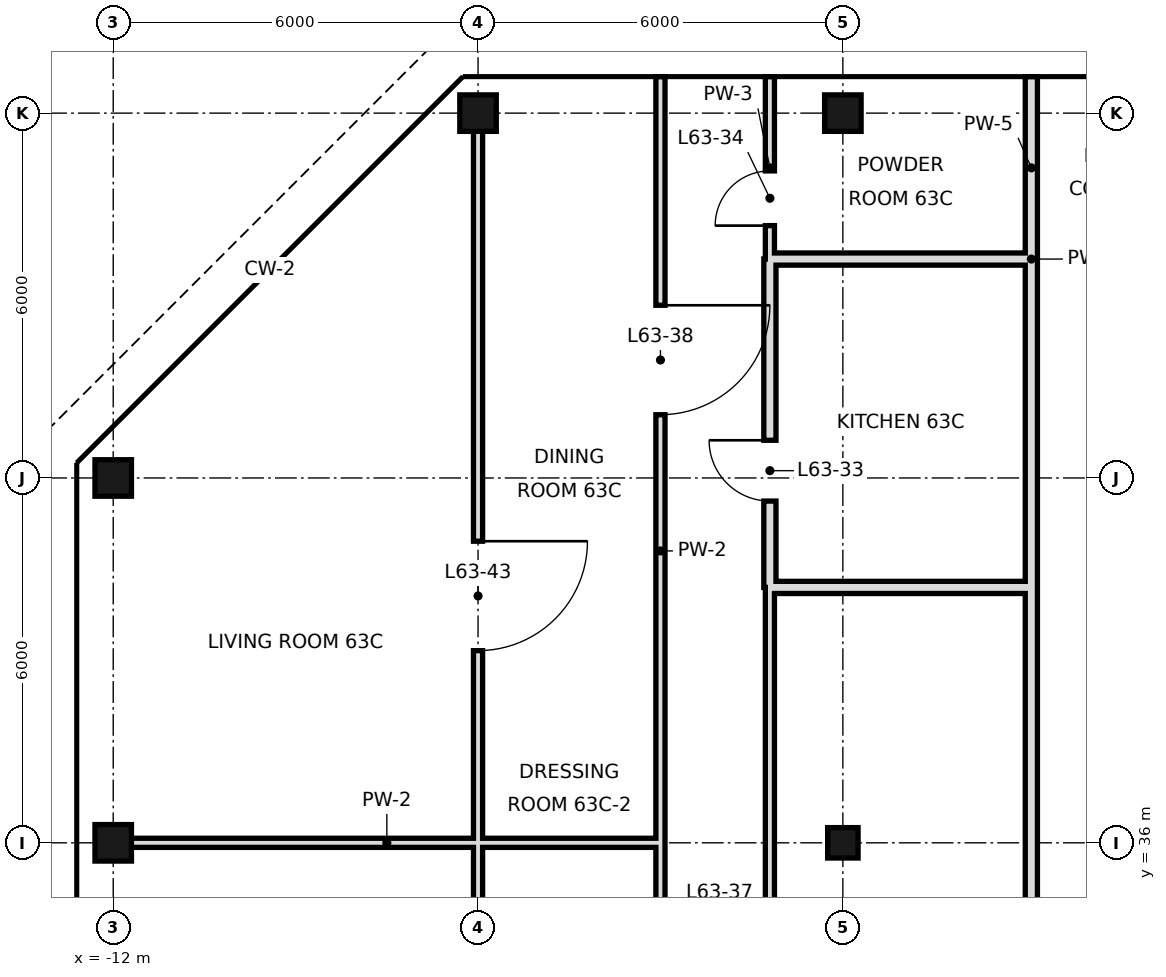
"""IFC4 building model, lengths in metres.
Left out: names, types, materials, properties, quantities, classifications, styles, units other than length and angle.
Written with IfcOpenShell. Run it as: python <this file> out.ifc"""

import sys

from ifc_helpers import new_model, si_unit, direction, frame, frame_2d, origin, origin_2d, place, context, subcontext, project, spatial, rectangle, hollow_rectangle, extrude, element, fill, save


model = new_model("IFC4")
c1 = context("Model", 3, precision=1e-05, world=origin(), true_north=direction((0.0, 1.0)))
c2 = subcontext(c1, "Body", "Model", "MODEL_VIEW")
j1 = project(units=[si_unit("LENGTHUNIT", "METRE"), si_unit("PLANEANGLEUNIT", "RADIAN")], contexts=[c1])
p1 = place(None, origin())
s1 = spatial("IfcSite", under=j1, at=p1, CompositionType="ELEMENT")
p2 = place(p1, origin())
s2 = spatial("IfcBuilding", under=s1, at=p2, CompositionType="ELEMENT")
p3 = place(p2, frame((0.0, 0.0, 266.6)))
s3 = spatial("IfcBuildingStorey", under=s2, at=p3, CompositionType="ELEMENT", Elevation=266.6)
for number, where, z_axis, x_axis in (
    (1, (-12.0, 36.0, 0.0), (0.0, 0.0, 1.0), (1.0, 0.0, 0.0)),
    (2, (-12.0, 42.0, 0.0), (0.0, 0.0, 1.0), (1.0, 0.0, 0.0)),
    (3, (-6.0, 48.0, 0.0), (0.0, 0.0, 1.0), (1.0, 0.0, 0.0)),
):
    element("IfcColumn", number, at=place(p3, frame(where, z_axis=z_axis, x_axis=x_axis)), inside=s3, PredefinedType="COLUMN", context=c2, shape_type="SweptSolid", body=[
        extrude(hollow_rectangle(XDim=0.6, YDim=0.6, WallThickness=0.028, at=origin_2d()), origin(), (0.0, 0.0, 1.0), 3.6),
    ])
p4 = place(p3, frame((0.0, 36.0, 0.0), z_axis=(0.0, 0.0, 1.0), x_axis=(1.0, 0.0, 0.0)))
e4 = element("IfcColumn", 4, at=p4, inside=s3, PredefinedType="COLUMN", context=c2, shape_type="SweptSolid", body=[
    extrude(hollow_rectangle(XDim=0.5, YDim=0.5, WallThickness=0.025, at=origin_2d()), origin(), (0.0, 0.0, 1.0), 3.6),
])
p5 = place(p3, frame((0.0, 48.0, 0.0), z_axis=(0.0, 0.0, 1.0), x_axis=(1.0, 0.0, 0.0)))
e5 = element("IfcColumn", 5, at=p5, inside=s3, PredefinedType="COLUMN", context=c2, shape_type="SweptSolid", body=[
    extrude(hollow_rectangle(XDim=0.6, YDim=0.6, WallThickness=0.028, at=origin_2d()), origin(), (0.0, 0.0, 1.0), 3.6),
])
p6 = place(p3, frame((-1.2, 40.2, 0.0), z_axis=(0.0, 0.0, 1.0), x_axis=(0.0, 1.0, 0.0)))
e6 = element("IfcWall", 6, at=p6, inside=s3, PredefinedType="SOLIDWALL", context=c2, shape_type="SweptSolid", body=[
    extrude(rectangle(XDim=5.4, YDim=0.2, at=frame_2d((2.7, 0.0))), origin(), (0.0, 0.0, 1.0), 2.72),
])
p7 = place(p6, frame((1.42, 0.0, 0.0)))
e7 = element("IfcOpeningElement", 7, at=p7, cuts=e6, PredefinedType="OPENING", context=c2, shape_type="SweptSolid", body=[
    extrude(rectangle(XDim=1.0, YDim=2.4, at=frame_2d((0.5, 1.2))), frame((0.0, 0.11, 0.0), z_axis=(0.0, -1.0, 0.0), x_axis=(1.0, 0.0, 0.0)), (0.0, 0.0, 1.0), 0.22),
])
p8 = place(p3, frame((-1.2, 18.0, 0.0), z_axis=(0.0, 0.0, 1.0), x_axis=(0.0, 1.0, 0.0)))
e8 = element("IfcWall", 8, at=p8, inside=s3, PredefinedType="PARTITIONING", context=c2, shape_type="SweptSolid", body=[
    extrude(rectangle(XDim=22.2, YDim=0.15, at=frame_2d((11.1, 0.0))), origin(), (0.0, 0.0, 1.0), 3.42),
])
p9 = place(p8, frame((6.64, 0.0, 0.0)))
e9 = element("IfcOpeningElement", 9, at=p9, cuts=e8, PredefinedType="OPENING", context=c2, shape_type="SweptSolid", body=[
    extrude(rectangle(XDim=1.0, YDim=2.4, at=frame_2d((0.5, 1.2))), frame((0.0, 0.085, 0.0), z_axis=(0.0, -1.0, 0.0), x_axis=(1.0, 0.0, 0.0)), (0.0, 0.0, 1.0), 0.17),
])
p10 = place(p8, frame((1.45, 0.0, 0.0)))
e10 = element("IfcOpeningElement", 10, at=p10, cuts=e8, PredefinedType="OPENING", context=c2, shape_type="SweptSolid", body=[
    extrude(rectangle(XDim=0.9, YDim=2.1, at=frame_2d((0.45, 1.05))), frame((0.0, 0.085, 0.0), z_axis=(0.0, -1.0, 0.0), x_axis=(1.0, 0.0, 0.0)), (0.0, 0.0, 1.0), 0.17),
])
p11 = place(p8, frame((15.7, 0.0, 0.0)))
e11 = element("IfcOpeningElement", 11, at=p11, cuts=e8, PredefinedType="OPENING", context=c2, shape_type="SweptSolid", body=[
    extrude(rectangle(XDim=1.0, YDim=2.4, at=frame_2d((0.5, 1.2))), frame((0.0, 0.085, 0.0), z_axis=(0.0, -1.0, 0.0), x_axis=(1.0, 0.0, 0.0)), (0.0, 0.0, 1.0), 0.17),
])
p12 = place(p3, frame((-1.2, 45.6, 0.0), z_axis=(0.0, 0.0, 1.0), x_axis=(0.0, 1.0, 0.0)))
e12 = element("IfcWall", 12, at=p12, inside=s3, PredefinedType="PARTITIONING", context=c2, shape_type="SweptSolid", body=[
    extrude(rectangle(XDim=3.0, YDim=0.15, at=frame_2d((1.5, 0.0))), origin(), (0.0, 0.0, 1.0), 3.42),
])
p13 = place(p12, frame((0.55, 0.0, 0.0)))
e13 = element("IfcOpeningElement", 13, at=p13, cuts=e12, PredefinedType="OPENING", context=c2, shape_type="SweptSolid", body=[
    extrude(rectangle(XDim=0.9, YDim=2.4, at=frame_2d((0.45, 1.2))), frame((0.0, 0.085, 0.0), z_axis=(0.0, -1.0, 0.0), x_axis=(1.0, 0.0, 0.0)), (0.0, 0.0, 1.0), 0.17),
])
p14 = place(p3, frame((-3.0, 33.0, 0.0), z_axis=(0.0, 0.0, 1.0), x_axis=(0.0, 1.0, 0.0)))
e14 = element("IfcWall", 14, at=p14, inside=s3, PredefinedType="PARTITIONING", context=c2, shape_type="SweptSolid", body=[
    extrude(rectangle(XDim=15.6, YDim=0.15, at=frame_2d((7.8, 0.0))), origin(), (0.0, 0.0, 1.0), 3.42),
])
p15 = place(p14, frame((0.7, 0.0, 0.0)))
e15 = element("IfcOpeningElement", 15, at=p15, cuts=e14, PredefinedType="OPENING", context=c2, shape_type="SweptSolid", body=[
    extrude(rectangle(XDim=1.0, YDim=2.4, at=frame_2d((0.5, 1.2))), frame((0.0, 0.085, 0.0), z_axis=(0.0, -1.0, 0.0), x_axis=(1.0, 0.0, 0.0)), (0.0, 0.0, 1.0), 0.17),
])
p16 = place(p14, frame((10.04, 0.0, 0.0)))
e16 = element("IfcOpeningElement", 16, at=p16, cuts=e14, PredefinedType="OPENING", context=c2, shape_type="SweptSolid", body=[
    extrude(rectangle(XDim=1.8, YDim=2.4, at=frame_2d((0.9, 1.2))), frame((0.0, 0.085, 0.0), z_axis=(0.0, -1.0, 0.0), x_axis=(1.0, 0.0, 0.0)), (0.0, 0.0, 1.0), 0.17),
])
p17 = place(p3, frame((-6.0, 33.0, 0.0), z_axis=(0.0, 0.0, 1.0), x_axis=(0.0, 1.0, 0.0)))
e17 = element("IfcWall", 17, at=p17, inside=s3, PredefinedType="PARTITIONING", context=c2, shape_type="SweptSolid", body=[
    extrude(rectangle(XDim=15.0, YDim=0.15, at=frame_2d((7.5, 0.0))), origin(), (0.0, 0.0, 1.0), 3.42),
])
p18 = place(p17, frame((0.7, 0.0, 0.0)))
e18 = element("IfcOpeningElement", 18, at=p18, cuts=e17, PredefinedType="OPENING", context=c2, shape_type="SweptSolid", body=[
    extrude(rectangle(XDim=1.0, YDim=2.4, at=frame_2d((0.5, 1.2))), frame((0.0, 0.085, 0.0), z_axis=(0.0, -1.0, 0.0), x_axis=(1.0, 0.0, 0.0)), (0.0, 0.0, 1.0), 0.17),
])
p19 = place(p17, frame((6.16, 0.0, 0.0)))
e19 = element("IfcOpeningElement", 19, at=p19, cuts=e17, PredefinedType="OPENING", context=c2, shape_type="SweptSolid", body=[
    extrude(rectangle(XDim=1.8, YDim=2.4, at=frame_2d((0.9, 1.2))), frame((0.0, 0.085, 0.0), z_axis=(0.0, -1.0, 0.0), x_axis=(1.0, 0.0, 0.0)), (0.0, 0.0, 1.0), 0.17),
])
p20 = place(p3, frame((3.1, 18.7, 0.0), z_axis=(0.0, 0.0, 1.0), x_axis=(0.0, 1.0, 0.0)))
e20 = element("IfcWall", 20, at=p20, inside=s3, PredefinedType="SOLIDWALL", context=c2, shape_type="SweptSolid", body=[
    extrude(rectangle(XDim=21.5, YDim=0.2, at=frame_2d((10.75, 0.0))), origin(), (0.0, 0.0, 1.0), 2.97),
])
p21 = place(p20, frame((6.5, 0.0, 0.0)))
e21 = element("IfcOpeningElement", 21, at=p21, cuts=e20, PredefinedType="OPENING", context=c2, shape_type="SweptSolid", body=[
    extrude(rectangle(XDim=1.2, YDim=2.4, at=frame_2d((0.6, 1.2))), frame((0.0, 0.11, 0.0), z_axis=(0.0, -1.0, 0.0), x_axis=(1.0, 0.0, 0.0)), (0.0, 0.0, 1.0), 0.22),
])
p22 = place(p3, frame((3.1, 45.6, 0.0), z_axis=(0.0, 0.0, 1.0), x_axis=(0.0, 1.0, 0.0)))
e22 = element("IfcWall", 22, at=p22, inside=s3, PredefinedType="SOLIDWALL", context=c2, shape_type="SweptSolid", body=[
    extrude(rectangle(XDim=3.0, YDim=0.2, at=frame_2d((1.5, 0.0))), origin(), (0.0, 0.0, 1.0), 2.72),
])
p23 = place(p3, frame((3.1, 40.2, 0.0), z_axis=(0.0, 0.0, 1.0), x_axis=(0.0, 1.0, 0.0)))
e23 = element("IfcWall", 23, at=p23, inside=s3, PredefinedType="SOLIDWALL", context=c2, shape_type="SweptSolid", body=[
    extrude(rectangle(XDim=5.4, YDim=0.2, at=frame_2d((2.7, 0.0))), origin(), (0.0, 0.0, 1.0), 2.97),
])
p24 = place(p3, frame((-12.0, 36.0, 0.0), z_axis=(0.0, 0.0, 1.0), x_axis=(1.0, 0.0, 0.0)))
e24 = element("IfcWall", 24, at=p24, inside=s3, PredefinedType="PARTITIONING", context=c2, shape_type="SweptSolid", body=[
    extrude(rectangle(XDim=9.0, YDim=0.15, at=frame_2d((4.5, 0.0))), origin(), (0.0, 0.0, 1.0), 2.72),
])
for number, where, z_axis, x_axis in (
    (25, (-1.2, 40.2, 0.0), (0.0, 0.0, 1.0), (1.0, 0.0, 0.0)),
    (26, (-1.2, 45.6, 0.0), (0.0, 0.0, 1.0), (1.0, 0.0, 0.0)),
):
    element("IfcWall", number, at=place(p3, frame(where, z_axis=z_axis, x_axis=x_axis)), inside=s3, PredefinedType="SOLIDWALL", context=c2, shape_type="SweptSolid", body=[
        extrude(rectangle(XDim=4.3, YDim=0.2, at=frame_2d((2.15, 0.0))), origin(), (0.0, 0.0, 1.0), 2.72),
    ])
p25 = place(p7, frame((1.0, 0.0, 0.0), z_axis=(0.0, 0.0, 1.0), x_axis=(-1.0, 0.0, 0.0)))
e27 = element("IfcDoor", 27, at=p25, inside=s3, OperationType="SINGLE_SWING_LEFT", PredefinedType="DOOR", context=c2, shape_type="SweptSolid", body=[
    extrude(rectangle(XDim=1.0, YDim=2.4, at=frame_2d((0.5, 1.2))), frame((0.0, 0.025, 0.0), z_axis=(0.0, -1.0, 0.0), x_axis=(1.0, 0.0, 0.0)), (0.0, 0.0, 1.0), 0.05),
])
fill(e7, e27)
p26 = place(p13, origin())
e28 = element("IfcDoor", 28, at=p26, inside=s3, OperationType="SINGLE_SWING_LEFT", PredefinedType="DOOR", context=c2, shape_type="SweptSolid", body=[
    extrude(rectangle(XDim=0.9, YDim=2.4, at=frame_2d((0.45, 1.2))), frame((0.0, 0.025, 0.0), z_axis=(0.0, -1.0, 0.0), x_axis=(1.0, 0.0, 0.0)), (0.0, 0.0, 1.0), 0.05),
])
fill(e13, e28)
p27 = place(p16, origin())
e29 = element("IfcDoor", 29, at=p27, inside=s3, OperationType="SINGLE_SWING_RIGHT", PredefinedType="DOOR", context=c2, shape_type="SweptSolid", body=[
    extrude(rectangle(XDim=1.8, YDim=2.4, at=frame_2d((0.9, 1.2))), frame((0.0, 0.025, 0.0), z_axis=(0.0, -1.0, 0.0), x_axis=(1.0, 0.0, 0.0)), (0.0, 0.0, 1.0), 0.05),
])
fill(e16, e29)
p28 = place(p19, origin())
e30 = element("IfcDoor", 30, at=p28, inside=s3, OperationType="SINGLE_SWING_RIGHT", PredefinedType="DOOR", context=c2, shape_type="SweptSolid", body=[
    extrude(rectangle(XDim=1.8, YDim=2.4, at=frame_2d((0.9, 1.2))), frame((0.0, 0.025, 0.0), z_axis=(0.0, -1.0, 0.0), x_axis=(1.0, 0.0, 0.0)), (0.0, 0.0, 1.0), 0.05),
])
fill(e19, e30)
save(model, sys.argv[1])
